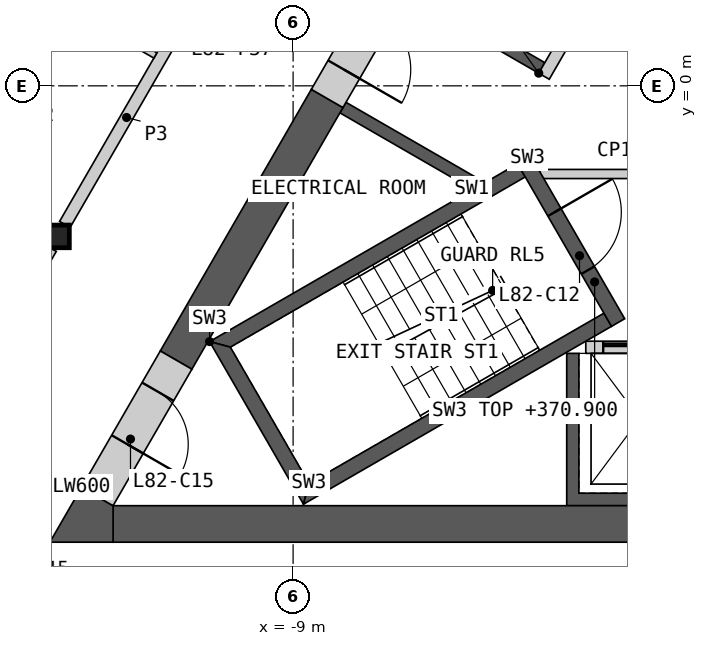
"""IFC4 building model, lengths in metres.
Left out: names, types, materials, properties, quantities, classifications, styles, units other than length and angle.
Written with IfcOpenShell. Run it as: python <this file> out.ifc"""

import sys

from ifc_helpers import new_model, si_unit, direction, frame, frame_2d, origin, origin_2d, place, context, subcontext, project, spatial, polyline, rectangle, i_section, outline, extrude, element, fill, save


model = new_model("IFC4")
c1 = context("Model", 3, precision=1e-05, world=origin(), true_north=direction((0.0, 1.0)))
c2 = subcontext(c1, "Body", "Model", "MODEL_VIEW")
j1 = project(units=[si_unit("LENGTHUNIT", "METRE"), si_unit("PLANEANGLEUNIT", "RADIAN")], contexts=[c1])
p1 = place(None, origin())
s1 = spatial("IfcSite", under=j1, at=p1, CompositionType="ELEMENT")
p2 = place(p1, origin())
s2 = spatial("IfcBuilding", under=s1, at=p2, CompositionType="ELEMENT")
p3 = place(p2, frame((0.0, 0.0, 367.8)))
s3 = spatial("IfcBuildingStorey", under=s2, at=p3, CompositionType="ELEMENT", Elevation=367.8)
p4 = place(p3, frame((-12.868, -2.476, 0.0), z_axis=(0.0, 0.0, 1.0), x_axis=(1.0, 0.0, 0.0)))
e1 = element("IfcColumn", 1, at=p4, inside=s3, PredefinedType="COLUMN", context=c2, shape_type="SweptSolid", body=[
    extrude(i_section(OverallWidth=0.374, OverallDepth=0.372, WebThickness=0.016, FlangeThickness=0.026, at=origin_2d()), origin(), (0.0, 0.0, 1.0), 3.4),
])
p5 = place(p3, origin())
e2 = element("IfcWall", 2, at=p5, inside=s3, PredefinedType="SHEAR", context=c2, shape_type="SweptSolid", body=[
    extrude(outline(polyline([(4.5, -4.4), (4.5, -6.906), (-4.5, -6.906), (-4.5, -4.4), (-4.3, -4.4), (-4.3, -6.7), (-2.3, -6.7), (-2.3, -4.4), (-2.1, -4.4), (-2.1, -6.7), (-0.1, -6.7), (-0.1, -4.4), (0.1, -4.4), (0.1, -6.7), (2.1, -6.7), (2.1, -4.4), (2.3, -4.4), (2.3, -6.7), (4.3, -6.7), (4.3, -4.4), (4.5, -4.4)])), origin(), (0.0, 0.0, 1.0), 3.1),
])
p6 = place(p3, frame((-4.187, -4.3, 0.0), z_axis=(0.0, 0.0, 1.0), x_axis=(1.0, 0.0, 0.0)))
e3 = element("IfcWall", 3, at=p6, inside=s3, PredefinedType="SOLIDWALL", context=c2, shape_type="SweptSolid", body=[
    extrude(rectangle(XDim=8.373, YDim=0.2, at=frame_2d((4.187, 0.0))), origin(), (0.0, 0.0, 1.0), 3.1),
])
p7 = place(p6, frame((0.287, 0.0, 0.0)))
e4 = element("IfcOpeningElement", 4, at=p7, cuts=e3, PredefinedType="OPENING", context=c2, shape_type="SweptSolid", body=[
    extrude(rectangle(XDim=1.2, YDim=2.1, at=frame_2d((0.6, 1.05))), frame((0.0, 0.11, 0.0), z_axis=(0.0, -1.0, 0.0), x_axis=(1.0, 0.0, 0.0)), (0.0, 0.0, 1.0), 0.22),
])
p8 = place(p6, frame((2.387, 0.0, 0.0)))
e5 = element("IfcOpeningElement", 5, at=p8, cuts=e3, PredefinedType="OPENING", context=c2, shape_type="SweptSolid", body=[
    extrude(rectangle(XDim=1.4, YDim=2.1, at=frame_2d((0.7, 1.05))), frame((0.0, 0.11, 0.0), z_axis=(0.0, -1.0, 0.0), x_axis=(1.0, 0.0, 0.0)), (0.0, 0.0, 1.0), 0.22),
])
p9 = place(p6, frame((4.737, 0.0, 0.0)))
e6 = element("IfcOpeningElement", 6, at=p9, cuts=e3, PredefinedType="OPENING", context=c2, shape_type="SweptSolid", body=[
    extrude(rectangle(XDim=1.1, YDim=2.1, at=frame_2d((0.55, 1.05))), frame((0.0, 0.11, 0.0), z_axis=(0.0, -1.0, 0.0), x_axis=(1.0, 0.0, 0.0)), (0.0, 0.0, 1.0), 0.22),
])
p10 = place(p6, frame((6.887, 0.0, 0.0)))
e7 = element("IfcOpeningElement", 7, at=p10, cuts=e3, PredefinedType="OPENING", context=c2, shape_type="SweptSolid", body=[
    extrude(rectangle(XDim=1.2, YDim=2.1, at=frame_2d((0.6, 1.05))), frame((0.0, 0.11, 0.0), z_axis=(0.0, -1.0, 0.0), x_axis=(1.0, 0.0, 0.0)), (0.0, 0.0, 1.0), 0.22),
])
p11 = place(p3, origin())
e8 = element("IfcWall", 8, at=p11, inside=s3, PredefinedType="SHEAR", context=c2, shape_type="SweptSolid", body=[
    extrude(outline(polyline([(-6.061, -1.697), (-8.231, -0.444), (-8.131, -0.271), (-5.96, -1.524), (-6.061, -1.697)])), origin(), (0.0, 0.0, 1.0), 3.1),
])
p12 = place(p3, origin())
e9 = element("IfcWall", 9, at=p12, inside=s3, PredefinedType="SHEAR", context=c2, shape_type="SweptSolid", body=[
    extrude(outline(polyline([(-4.96, 0.208), (-7.131, 1.461), (-3.731, 7.35), (-1.561, 6.097), (-1.66, 5.924), (-3.652, 7.074), (-5.752, 3.437), (-3.76, 2.287), (-3.861, 2.113), (-5.852, 3.263), (-6.852, 1.531), (-4.861, 0.381), (-4.96, 0.208)])), origin(), (0.0, 0.0, 1.0), 3.1),
])
p13 = place(p3, frame((-1.631, 5.776, 0.0), z_axis=(0.0, 0.0, 1.0), x_axis=(-0.499992876559, -0.866029516466, 0.0)))
e10 = element("IfcWall", 10, at=p13, inside=s3, PredefinedType="SOLIDWALL", context=c2, shape_type="SweptSolid", body=[
    extrude(rectangle(XDim=6.486, YDim=0.2, at=frame_2d((3.243, 0.0))), origin(), (0.0, 0.0, 1.0), 3.1),
])
p14 = place(p13, frame((1.537, 0.0, 0.0)))
e11 = element("IfcOpeningElement", 11, at=p14, cuts=e10, PredefinedType="OPENING", context=c2, shape_type="SweptSolid", body=[
    extrude(rectangle(XDim=0.9, YDim=2.1, at=frame_2d((0.45, 1.05))), frame((0.0, 0.11, 0.0), z_axis=(0.0, -1.0, 0.0), x_axis=(1.0, 0.0, 0.0)), (0.0, 0.0, 1.0), 0.22),
])
p15 = place(p13, frame((4.837, 0.0, 0.0)))
e12 = element("IfcOpeningElement", 12, at=p15, cuts=e10, PredefinedType="OPENING", context=c2, shape_type="SweptSolid", body=[
    extrude(rectangle(XDim=0.9, YDim=2.1, at=frame_2d((0.45, 1.05))), frame((0.0, 0.11, 0.0), z_axis=(0.0, -1.0, 0.0), x_axis=(1.0, 0.0, 0.0)), (0.0, 0.0, 1.0), 0.22),
])
p16 = place(p3, frame((-4.941, -1.45, 0.0), z_axis=(0.0, 0.0, 1.0), x_axis=(1.0, 0.0, 0.0)))
e13 = element("IfcWall", 13, at=p16, inside=s3, PredefinedType="PARTITIONING", context=c2, shape_type="SweptSolid", body=[
    extrude(rectangle(XDim=9.882, YDim=0.15, at=frame_2d((4.941, 0.0))), origin(), (0.0, 0.0, 1.0), 3.1),
])
p17 = place(p16, frame((4.391, 0.0, 0.0)))
e14 = element("IfcOpeningElement", 14, at=p17, cuts=e13, PredefinedType="OPENING", context=c2, shape_type="SweptSolid", body=[
    extrude(rectangle(XDim=1.1, YDim=2.1, at=frame_2d((0.55, 1.05))), frame((0.0, 0.085, 0.0), z_axis=(0.0, -1.0, 0.0), x_axis=(1.0, 0.0, 0.0)), (0.0, 0.0, 1.0), 0.17),
])
p18 = place(p3, origin())
e15 = element("IfcWall", 15, at=p18, inside=s3, PredefinedType="SHEAR", context=c2, shape_type="SweptSolid", body=[
    extrude(outline(polyline([(-5.307, -1.281), (-10.374, -4.206), (-10.032, -4.298), (-5.182, -1.498), (-5.307, -1.281)])), origin(), (0.0, 0.0, 1.0), 3.1),
])
p19 = place(p3, origin())
e16 = element("IfcWall", 16, at=p19, inside=s3, PredefinedType="SHEAR", context=c2, shape_type="SweptSolid", body=[
    extrude(outline(polyline([(-10.374, -4.206), (-8.83, -6.881), (-8.738, -6.539), (-10.032, -4.298), (-10.374, -4.206)])), origin(), (0.0, 0.0, 1.0), 3.1),
])
p20 = place(p3, origin())
e17 = element("IfcWall", 17, at=p20, inside=s3, PredefinedType="SHEAR", context=c2, shape_type="SweptSolid", body=[
    extrude(outline(polyline([(-8.738, -6.539), (-8.83, -6.881), (-3.763, -3.956), (-3.888, -3.739), (-8.738, -6.539)])), origin(), (0.0, 0.0, 1.0), 3.1),
])
p21 = place(p3, frame((-5.199, -1.219, 0.0), z_axis=(0.0, 0.0, 1.0), x_axis=(0.499982516597, -0.866035497597, 0.0)))
e18 = element("IfcWall", 18, at=p21, inside=s3, PredefinedType="SHEAR", context=c2, shape_type="SweptSolid", body=[
    extrude(rectangle(XDim=3.088, YDim=0.25, at=frame_2d((1.544, 0.0))), origin(), (0.0, 0.0, 1.0), 3.1),
])
p22 = place(p21, frame((0.994, 0.0, 0.0)))
e19 = element("IfcOpeningElement", 19, at=p22, cuts=e18, PredefinedType="OPENING", context=c2, shape_type="SweptSolid", body=[
    extrude(rectangle(XDim=1.1, YDim=2.1, at=frame_2d((0.55, 1.05))), frame((0.0, 0.135, 0.0), z_axis=(0.0, -1.0, 0.0), x_axis=(1.0, 0.0, 0.0)), (0.0, 0.0, 1.0), 0.27),
])
p23 = place(p3, frame((-11.961, -7.206, 0.0), z_axis=(0.0, 0.0, 1.0), x_axis=(1.0, 0.0, 0.0)))
e20 = element("IfcWall", 20, at=p23, inside=s3, PredefinedType="SHEAR", context=c2, shape_type="SweptSolid", body=[
    extrude(rectangle(XDim=23.921, YDim=0.6, at=frame_2d((11.961, 0.0))), origin(), (0.0, 0.0, 1.0), 3.1),
])
p24 = place(p3, frame((-8.44, -0.208, 0.0), z_axis=(0.0, 0.0, 1.0), x_axis=(-0.500007425856, -0.866021116422, 0.0)))
e21 = element("IfcWall", 21, at=p24, inside=s3, PredefinedType="SHEAR", context=c2, shape_type="SweptSolid", body=[
    extrude(rectangle(XDim=4.969, YDim=0.6, at=frame_2d((2.484, 0.0))), origin(), (0.0, 0.0, 1.0), 3.1),
])
p25 = place(p3, origin())
e22 = element("IfcWall", 22, at=p25, inside=s3, PredefinedType="SHEAR", context=c2, shape_type="SweptSolid", body=[
    extrude(outline(polyline([(-12.48, -6.606), (-11.961, -6.906), (-11.961, -7.506), (-13.0, -7.506), (-12.48, -6.606)])), origin(), (0.0, 0.0, 1.0), 3.1),
])
p26 = place(p3, frame((-10.925, -4.511, 0.0), z_axis=(0.0, 0.0, 1.0), x_axis=(-0.500018667571, -0.866014625789, 0.0)))
e23 = element("IfcWall", 23, at=p26, inside=s3, PredefinedType="SHEAR", context=c2, shape_type="SweptSolid", body=[
    extrude(rectangle(XDim=2.592, YDim=0.6, at=frame_2d((1.296, 0.0))), origin(), (0.0, 0.0, 1.0), 3.1),
])
p27 = place(p26, frame((0.6, 0.0, 0.0)))
e24 = element("IfcOpeningElement", 24, at=p27, cuts=e23, PredefinedType="OPENING", context=c2, shape_type="SweptSolid", body=[
    extrude(rectangle(XDim=1.0, YDim=2.1, at=frame_2d((0.5, 1.05))), frame((0.0, 0.31, 0.0), z_axis=(0.0, -1.0, 0.0), x_axis=(1.0, 0.0, 0.0)), (0.0, 0.0, 1.0), 0.62),
])
p28 = place(p3, frame((-7.34, 1.698, 0.0), z_axis=(0.0, 0.0, 1.0), x_axis=(-0.50002983664, -0.866008176907, 0.0)))
e25 = element("IfcWall", 25, at=p28, inside=s3, PredefinedType="SHEAR", context=c2, shape_type="SweptSolid", body=[
    extrude(rectangle(XDim=2.2, YDim=0.6, at=frame_2d((1.1, 0.0))), origin(), (0.0, 0.0, 1.0), 3.1),
])
p29 = place(p28, frame((0.55, 0.0, 0.0)))
e26 = element("IfcOpeningElement", 26, at=p29, cuts=e25, PredefinedType="OPENING", context=c2, shape_type="SweptSolid", body=[
    extrude(rectangle(XDim=1.1, YDim=2.1, at=frame_2d((0.55, 1.05))), frame((0.0, 0.31, 0.0), z_axis=(0.0, -1.0, 0.0), x_axis=(1.0, 0.0, 0.0)), (0.0, 0.0, 1.0), 0.62),
])
p30 = place(p3, frame((-12.754, -2.279, 0.0), z_axis=(0.0, 0.0, 1.0), x_axis=(0.500001682468, 0.866024432409, 0.0)))
e27 = element("IfcWall", 27, at=p30, inside=s3, PredefinedType="PARTITIONING", context=c2, shape_type="SweptSolid", body=[
    extrude(rectangle(XDim=8.124, YDim=0.2, at=frame_2d((4.062, 0.0))), origin(), (0.0, 0.0, 1.0), 3.1),
])
p31 = place(p30, frame((3.762, 0.0, 0.0)))
e28 = element("IfcOpeningElement", 28, at=p31, cuts=e27, PredefinedType="OPENING", context=c2, shape_type="SweptSolid", body=[
    extrude(rectangle(XDim=1.0, YDim=2.1, at=frame_2d((0.5, 1.05))), frame((0.0, 0.11, 0.0), z_axis=(0.0, -1.0, 0.0), x_axis=(1.0, 0.0, 0.0)), (0.0, 0.0, 1.0), 0.22),
])
p32 = place(p3, frame((-15.131, -6.397, 0.0), z_axis=(0.0, 0.0, 1.0), x_axis=(0.499986217557, 0.866033360935, 0.0)))
e29 = element("IfcWall", 29, at=p32, inside=s3, PredefinedType="PARTITIONING", context=c2, shape_type="SweptSolid", body=[
    extrude(rectangle(XDim=4.3, YDim=0.2, at=frame_2d((2.15, 0.0))), origin(), (0.0, 0.0, 1.0), 3.1),
])
p33 = place(p3, frame((-17.414, 4.049, 0.0), z_axis=(0.0, 0.0, 1.0), x_axis=(0.866033839264, -0.499985389037, 0.0)))
e30 = element("IfcWall", 30, at=p33, inside=s3, PredefinedType="PARTITIONING", context=c2, shape_type="SweptSolid", body=[
    extrude(rectangle(XDim=7.1, YDim=0.1, at=frame_2d((3.55, 0.0))), origin(), (0.0, 0.0, 1.0), 2.33),
])
p34 = place(p33, frame((1.158, 0.0, 0.0)))
e31 = element("IfcOpeningElement", 31, at=p34, cuts=e30, PredefinedType="OPENING", context=c2, shape_type="SweptSolid", body=[
    extrude(rectangle(XDim=0.95, YDim=2.1, at=frame_2d((0.475, 1.05))), frame((0.0, 0.06, 0.0), z_axis=(0.0, -1.0, 0.0), x_axis=(1.0, 0.0, 0.0)), (0.0, 0.0, 1.0), 0.12),
])
p35 = place(p7, origin())
e32 = element("IfcDoor", 32, at=p35, inside=s3, OperationType="SLIDING_TO_LEFT", PredefinedType="DOOR", context=c2, shape_type="SweptSolid", body=[
    extrude(rectangle(XDim=1.2, YDim=2.1, at=frame_2d((0.6, 1.05))), frame((0.0, 0.025, 0.0), z_axis=(0.0, -1.0, 0.0), x_axis=(1.0, 0.0, 0.0)), (0.0, 0.0, 1.0), 0.05),
])
fill(e4, e32)
p36 = place(p22, origin())
e33 = element("IfcDoor", 33, at=p36, inside=s3, OperationType="SINGLE_SWING_LEFT", PredefinedType="DOOR", context=c2, shape_type="SweptSolid", body=[
    extrude(rectangle(XDim=1.1, YDim=2.1, at=frame_2d((0.55, 1.05))), frame((0.0, 0.025, 0.0), z_axis=(0.0, -1.0, 0.0), x_axis=(1.0, 0.0, 0.0)), (0.0, 0.0, 1.0), 0.05),
])
fill(e19, e33)
p37 = place(p27, origin())
e34 = element("IfcDoor", 34, at=p37, inside=s3, OperationType="SINGLE_SWING_RIGHT", PredefinedType="DOOR", context=c2, shape_type="SweptSolid", body=[
    extrude(rectangle(XDim=1.0, YDim=2.1, at=frame_2d((0.5, 1.05))), frame((0.0, 0.055, 0.0), z_axis=(0.0, -1.0, 0.0), x_axis=(1.0, 0.0, 0.0)), (0.0, 0.0, 1.0), 0.05),
])
fill(e24, e34)
p38 = place(p29, origin())
e35 = element("IfcDoor", 35, at=p38, inside=s3, OperationType="SINGLE_SWING_RIGHT", PredefinedType="DOOR", context=c2, shape_type="SweptSolid", body=[
    extrude(rectangle(XDim=1.1, YDim=2.1, at=frame_2d((0.55, 1.05))), frame((0.0, 0.055, 0.0), z_axis=(0.0, -1.0, 0.0), x_axis=(1.0, 0.0, 0.0)), (0.0, 0.0, 1.0), 0.05),
])
fill(e26, e35)
save(model, sys.argv[1])
